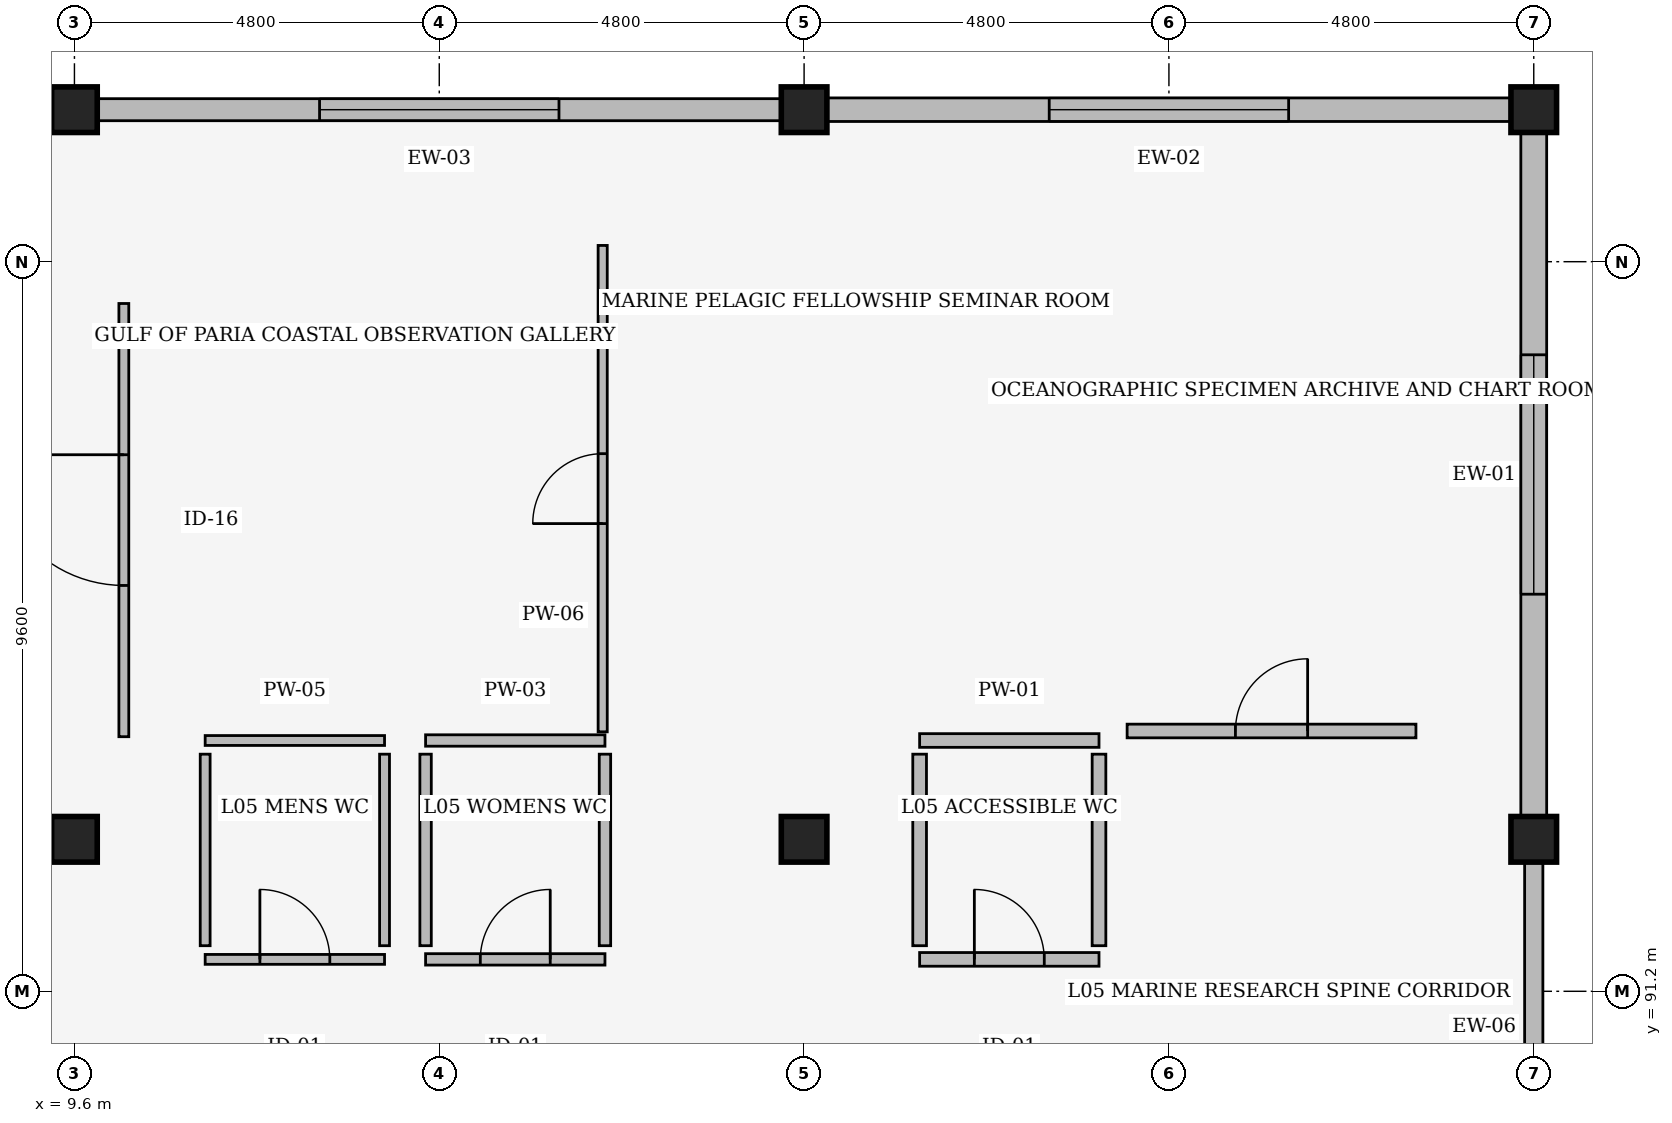
"""IFC4 building model, lengths in metres.
Left out: names, types, materials, properties, quantities, classifications, styles, units other than length and angle.
Written with IfcOpenShell. Run it as: python <this file> out.ifc"""

import sys

from ifc_helpers import new_model, si_unit, direction, frame, frame_2d, origin, origin_2d, place, context, subcontext, project, spatial, rectangle, extrude, element, fill, save


model = new_model("IFC4")
c1 = context("Model", 3, precision=1e-05, world=origin(), true_north=direction((0.0, 1.0)))
c2 = subcontext(c1, "Body", "Model", "MODEL_VIEW")
j1 = project(units=[si_unit("LENGTHUNIT", "METRE"), si_unit("PLANEANGLEUNIT", "RADIAN")], contexts=[c1])
p1 = place(None, origin())
s1 = spatial("IfcSite", under=j1, at=p1, CompositionType="ELEMENT")
p2 = place(p1, origin())
s2 = spatial("IfcBuilding", under=s1, at=p2, CompositionType="ELEMENT")
p3 = place(p2, frame((0.0, 0.0, 23.4)))
s3 = spatial("IfcBuildingStorey", under=s2, at=p3, CompositionType="ELEMENT", Elevation=23.4)
for number, where, z_axis, x_axis in (
    (1, (9.6, 93.2, 0.0), (0.0, 0.0, 1.0), (1.0, 0.0, 0.0)),
    (2, (9.6, 102.8, 0.0), (0.0, 0.0, 1.0), (1.0, 0.0, 0.0)),
    (3, (19.2, 93.2, 0.0), (0.0, 0.0, 1.0), (1.0, 0.0, 0.0)),
    (4, (19.2, 102.8, 0.0), (0.0, 0.0, 1.0), (1.0, 0.0, 0.0)),
    (5, (28.8, 93.2, 0.0), (0.0, 0.0, 1.0), (1.0, 0.0, 0.0)),
    (6, (28.8, 102.8, 0.0), (0.0, 0.0, 1.0), (1.0, 0.0, 0.0)),
):
    element("IfcColumn", number, at=place(p3, frame(where, z_axis=z_axis, x_axis=x_axis)), inside=s3, PredefinedType="COLUMN", context=c2, shape_type="SweptSolid", body=[
        extrude(rectangle(XDim=0.6, YDim=0.6, at=origin_2d()), origin(), (0.0, 0.0, 1.0), 3.6),
    ])
p4 = place(p3, frame((28.8, 83.908, 0.0), z_axis=(0.0, 0.0, 1.0), x_axis=(0.0, 1.0, 0.0)))
e7 = element("IfcWall", 7, at=p4, inside=s3, PredefinedType="SOLIDWALL", context=c2, shape_type="SweptSolid", body=[
    extrude(rectangle(XDim=8.984, YDim=0.24, at=frame_2d((4.492, 0.0))), origin(), (0.0, 0.0, 1.0), 3.239),
])
p5 = place(p4, frame((3.017, 0.0, 0.8)))
e8 = element("IfcOpeningElement", 8, at=p5, cuts=e7, PredefinedType="OPENING", context=c2, shape_type="SweptSolid", body=[
    extrude(rectangle(XDim=2.95, YDim=2.1, at=frame_2d((1.475, 1.05))), frame((0.0, 0.13, 0.0), z_axis=(0.0, -1.0, 0.0), x_axis=(1.0, 0.0, 0.0)), (0.0, 0.0, 1.0), 0.26),
])
p6 = place(p3, frame((28.8, 93.508, 0.0), z_axis=(0.0, 0.0, 1.0), x_axis=(0.0, 1.0, 0.0)))
e9 = element("IfcWall", 9, at=p6, inside=s3, PredefinedType="SOLIDWALL", context=c2, shape_type="SweptSolid", body=[
    extrude(rectangle(XDim=8.984, YDim=0.34, at=frame_2d((4.492, 0.0))), origin(), (0.0, 0.0, 1.0), 3.239),
])
p7 = place(p6, frame((2.917, 0.0, 0.95)))
e10 = element("IfcOpeningElement", 10, at=p7, cuts=e9, PredefinedType="OPENING", context=c2, shape_type="SweptSolid", body=[
    extrude(rectangle(XDim=3.15, YDim=1.2, at=frame_2d((1.575, 0.6))), frame((0.0, 0.18, 0.0), z_axis=(0.0, -1.0, 0.0), x_axis=(1.0, 0.0, 0.0)), (0.0, 0.0, 1.0), 0.36),
])
p8 = place(p3, frame((28.492, 102.8, 0.0), z_axis=(0.0, 0.0, 1.0), x_axis=(-1.0, 0.0, 0.0)))
e11 = element("IfcWall", 11, at=p8, inside=s3, PredefinedType="SOLIDWALL", context=c2, shape_type="SweptSolid", body=[
    extrude(rectangle(XDim=8.984, YDim=0.31, at=frame_2d((4.492, 0.0))), origin(), (0.0, 0.0, 1.0), 3.239),
])
p9 = place(p8, frame((2.917, 0.0, 0.95)))
e12 = element("IfcOpeningElement", 12, at=p9, cuts=e11, PredefinedType="OPENING", context=c2, shape_type="SweptSolid", body=[
    extrude(rectangle(XDim=3.15, YDim=1.5, at=frame_2d((1.575, 0.75))), frame((0.0, 0.165, 0.0), z_axis=(0.0, -1.0, 0.0), x_axis=(1.0, 0.0, 0.0)), (0.0, 0.0, 1.0), 0.33),
])
p10 = place(p3, frame((18.892, 102.8, 0.0), z_axis=(0.0, 0.0, 1.0), x_axis=(-1.0, 0.0, 0.0)))
e13 = element("IfcWall", 13, at=p10, inside=s3, PredefinedType="SOLIDWALL", context=c2, shape_type="SweptSolid", body=[
    extrude(rectangle(XDim=8.984, YDim=0.29, at=frame_2d((4.492, 0.0))), origin(), (0.0, 0.0, 1.0), 3.239),
])
p11 = place(p10, frame((2.917, 0.0, 0.95)))
e14 = element("IfcOpeningElement", 14, at=p11, cuts=e13, PredefinedType="OPENING", context=c2, shape_type="SweptSolid", body=[
    extrude(rectangle(XDim=3.15, YDim=1.8, at=frame_2d((1.575, 0.9))), frame((0.0, 0.155, 0.0), z_axis=(0.0, -1.0, 0.0), x_axis=(1.0, 0.0, 0.0)), (0.0, 0.0, 1.0), 0.31),
])
p12 = place(p3, frame((11.32, 94.5, 0.0), z_axis=(0.0, 0.0, 1.0), x_axis=(1.0, 0.0, 0.0)))
e15 = element("IfcWall", 15, at=p12, inside=s3, PredefinedType="PARTITIONING", context=c2, shape_type="SweptSolid", body=[
    extrude(rectangle(XDim=2.36, YDim=0.13, at=frame_2d((1.18, 0.0))), origin(), (0.0, 0.0, 1.0), 3.24),
])
p13 = place(p3, frame((11.32, 91.62, 0.0), z_axis=(0.0, 0.0, 1.0), x_axis=(1.0, 0.0, 0.0)))
e16 = element("IfcWall", 16, at=p13, inside=s3, PredefinedType="PARTITIONING", context=c2, shape_type="SweptSolid", body=[
    extrude(rectangle(XDim=2.36, YDim=0.13, at=frame_2d((1.18, 0.0))), origin(), (0.0, 0.0, 1.0), 3.24),
])
p14 = place(p13, frame((0.72, 0.0, 0.0)))
e17 = element("IfcOpeningElement", 17, at=p14, cuts=e16, PredefinedType="OPENING", context=c2, shape_type="SweptSolid", body=[
    extrude(rectangle(XDim=0.92, YDim=2.12, at=frame_2d((0.46, 1.06))), frame((0.0, 0.075, 0.0), z_axis=(0.0, -1.0, 0.0), x_axis=(1.0, 0.0, 0.0)), (0.0, 0.0, 1.0), 0.15),
])
for number, where, z_axis, x_axis in (
    (18, (11.32, 91.8, 0.0), (0.0, 0.0, 1.0), (0.0, 1.0, 0.0)),
    (19, (13.68, 91.8, 0.0), (0.0, 0.0, 1.0), (0.0, 1.0, 0.0)),
):
    element("IfcWall", number, at=place(p3, frame(where, z_axis=z_axis, x_axis=x_axis)), inside=s3, PredefinedType="PARTITIONING", context=c2, shape_type="SweptSolid", body=[
        extrude(rectangle(XDim=2.52, YDim=0.13, at=frame_2d((1.26, 0.0))), origin(), (0.0, 0.0, 1.0), 3.24),
    ])
p15 = place(p3, frame((14.22, 94.5, 0.0), z_axis=(0.0, 0.0, 1.0), x_axis=(1.0, 0.0, 0.0)))
e20 = element("IfcWall", 20, at=p15, inside=s3, PredefinedType="PARTITIONING", context=c2, shape_type="SweptSolid", body=[
    extrude(rectangle(XDim=2.36, YDim=0.15, at=frame_2d((1.18, 0.0))), origin(), (0.0, 0.0, 1.0), 3.24),
])
p16 = place(p3, frame((14.22, 91.62, 0.0), z_axis=(0.0, 0.0, 1.0), x_axis=(1.0, 0.0, 0.0)))
e21 = element("IfcWall", 21, at=p16, inside=s3, PredefinedType="PARTITIONING", context=c2, shape_type="SweptSolid", body=[
    extrude(rectangle(XDim=2.36, YDim=0.15, at=frame_2d((1.18, 0.0))), origin(), (0.0, 0.0, 1.0), 3.24),
])
p17 = place(p16, frame((0.72, 0.0, 0.0)))
e22 = element("IfcOpeningElement", 22, at=p17, cuts=e21, PredefinedType="OPENING", context=c2, shape_type="SweptSolid", body=[
    extrude(rectangle(XDim=0.92, YDim=2.12, at=frame_2d((0.46, 1.06))), frame((0.0, 0.085, 0.0), z_axis=(0.0, -1.0, 0.0), x_axis=(1.0, 0.0, 0.0)), (0.0, 0.0, 1.0), 0.17),
])
for number, where, z_axis, x_axis in (
    (23, (14.22, 91.8, 0.0), (0.0, 0.0, 1.0), (0.0, 1.0, 0.0)),
    (24, (16.58, 91.8, 0.0), (0.0, 0.0, 1.0), (0.0, 1.0, 0.0)),
):
    element("IfcWall", number, at=place(p3, frame(where, z_axis=z_axis, x_axis=x_axis)), inside=s3, PredefinedType="PARTITIONING", context=c2, shape_type="SweptSolid", body=[
        extrude(rectangle(XDim=2.52, YDim=0.15, at=frame_2d((1.26, 0.0))), origin(), (0.0, 0.0, 1.0), 3.24),
    ])
p18 = place(p3, frame((20.72, 94.5, 0.0), z_axis=(0.0, 0.0, 1.0), x_axis=(1.0, 0.0, 0.0)))
e25 = element("IfcWall", 25, at=p18, inside=s3, PredefinedType="PARTITIONING", context=c2, shape_type="SweptSolid", body=[
    extrude(rectangle(XDim=2.36, YDim=0.18, at=frame_2d((1.18, 0.0))), origin(), (0.0, 0.0, 1.0), 3.24),
])
p19 = place(p3, frame((20.72, 91.62, 0.0), z_axis=(0.0, 0.0, 1.0), x_axis=(1.0, 0.0, 0.0)))
e26 = element("IfcWall", 26, at=p19, inside=s3, PredefinedType="PARTITIONING", context=c2, shape_type="SweptSolid", body=[
    extrude(rectangle(XDim=2.36, YDim=0.18, at=frame_2d((1.18, 0.0))), origin(), (0.0, 0.0, 1.0), 3.24),
])
p20 = place(p19, frame((0.72, 0.0, 0.0)))
e27 = element("IfcOpeningElement", 27, at=p20, cuts=e26, PredefinedType="OPENING", context=c2, shape_type="SweptSolid", body=[
    extrude(rectangle(XDim=0.92, YDim=2.12, at=frame_2d((0.46, 1.06))), frame((0.0, 0.1, 0.0), z_axis=(0.0, -1.0, 0.0), x_axis=(1.0, 0.0, 0.0)), (0.0, 0.0, 1.0), 0.2),
])
for number, where, z_axis, x_axis in (
    (28, (20.72, 91.8, 0.0), (0.0, 0.0, 1.0), (0.0, 1.0, 0.0)),
    (29, (23.08, 91.8, 0.0), (0.0, 0.0, 1.0), (0.0, 1.0, 0.0)),
):
    element("IfcWall", number, at=place(p3, frame(where, z_axis=z_axis, x_axis=x_axis)), inside=s3, PredefinedType="PARTITIONING", context=c2, shape_type="SweptSolid", body=[
        extrude(rectangle(XDim=2.52, YDim=0.18, at=frame_2d((1.26, 0.0))), origin(), (0.0, 0.0, 1.0), 3.24),
    ])
p21 = place(p3, frame((10.25, 94.55, 0.0), z_axis=(0.0, 0.0, 1.0), x_axis=(0.0, 1.0, 0.0)))
e30 = element("IfcWall", 30, at=p21, inside=s3, PredefinedType="PARTITIONING", context=c2, shape_type="SweptSolid", body=[
    extrude(rectangle(XDim=5.7, YDim=0.13, at=frame_2d((2.85, 0.0))), origin(), (0.0, 0.0, 1.0), 3.24),
])
p22 = place(p21, frame((1.99, 0.0, 0.0)))
e31 = element("IfcOpeningElement", 31, at=p22, cuts=e30, PredefinedType="OPENING", context=c2, shape_type="SweptSolid", body=[
    extrude(rectangle(XDim=1.72, YDim=2.38, at=frame_2d((0.86, 1.19))), frame((0.0, 0.075, 0.0), z_axis=(0.0, -1.0, 0.0), x_axis=(1.0, 0.0, 0.0)), (0.0, 0.0, 1.0), 0.15),
])
p23 = place(p3, frame((16.55, 94.614, 0.0), z_axis=(0.0, 0.0, 1.0), x_axis=(0.0, 1.0, 0.0)))
e32 = element("IfcWall", 32, at=p23, inside=s3, PredefinedType="PARTITIONING", context=c2, shape_type="SweptSolid", body=[
    extrude(rectangle(XDim=6.4, YDim=0.12, at=frame_2d((3.2, 0.0))), origin(), (0.0, 0.0, 1.0), 3.24),
])
p24 = place(p23, frame((2.74, 0.0, 0.0)))
e33 = element("IfcOpeningElement", 33, at=p24, cuts=e32, PredefinedType="OPENING", context=c2, shape_type="SweptSolid", body=[
    extrude(rectangle(XDim=0.92, YDim=2.12, at=frame_2d((0.46, 1.06))), frame((0.0, 0.07, 0.0), z_axis=(0.0, -1.0, 0.0), x_axis=(1.0, 0.0, 0.0)), (0.0, 0.0, 1.0), 0.14),
])
p25 = place(p3, frame((23.45, 94.625, 0.0), z_axis=(0.0, 0.0, 1.0), x_axis=(1.0, 0.0, 0.0)))
e34 = element("IfcWall", 34, at=p25, inside=s3, PredefinedType="PARTITIONING", context=c2, shape_type="SweptSolid", body=[
    extrude(rectangle(XDim=3.8, YDim=0.18, at=frame_2d((1.9, 0.0))), origin(), (0.0, 0.0, 1.0), 3.24),
])
p26 = place(p25, frame((1.425, 0.0, 0.0)))
e35 = element("IfcOpeningElement", 35, at=p26, cuts=e34, PredefinedType="OPENING", context=c2, shape_type="SweptSolid", body=[
    extrude(rectangle(XDim=0.95, YDim=2.15, at=frame_2d((0.475, 1.075))), frame((0.0, 0.1, 0.0), z_axis=(0.0, -1.0, 0.0), x_axis=(1.0, 0.0, 0.0)), (0.0, 0.0, 1.0), 0.2),
])
p27 = place(p7, origin())
e36 = element("IfcWindow", 36, at=p27, inside=s3, PartitioningType="SINGLE_PANEL", PredefinedType="WINDOW", context=c2, shape_type="SweptSolid", body=[
    extrude(rectangle(XDim=3.15, YDim=1.2, at=frame_2d((1.575, 0.6))), frame((0.0, 0.03, 0.0), z_axis=(0.0, -1.0, 0.0), x_axis=(1.0, 0.0, 0.0)), (0.0, 0.0, 1.0), 0.06),
])
fill(e10, e36)
p28 = place(p9, origin())
e37 = element("IfcWindow", 37, at=p28, inside=s3, PartitioningType="SINGLE_PANEL", PredefinedType="WINDOW", context=c2, shape_type="SweptSolid", body=[
    extrude(rectangle(XDim=3.15, YDim=1.5, at=frame_2d((1.575, 0.75))), frame((0.0, 0.03, 0.0), z_axis=(0.0, -1.0, 0.0), x_axis=(1.0, 0.0, 0.0)), (0.0, 0.0, 1.0), 0.06),
])
fill(e12, e37)
p29 = place(p11, origin())
e38 = element("IfcWindow", 38, at=p29, inside=s3, PartitioningType="SINGLE_PANEL", PredefinedType="WINDOW", context=c2, shape_type="SweptSolid", body=[
    extrude(rectangle(XDim=3.15, YDim=1.8, at=frame_2d((1.575, 0.9))), frame((0.0, 0.03, 0.0), z_axis=(0.0, -1.0, 0.0), x_axis=(1.0, 0.0, 0.0)), (0.0, 0.0, 1.0), 0.06),
])
fill(e14, e38)
p30 = place(p14, origin())
e39 = element("IfcDoor", 39, at=p30, inside=s3, OperationType="SINGLE_SWING_LEFT", PredefinedType="DOOR", context=c2, shape_type="SweptSolid", body=[
    extrude(rectangle(XDim=0.92, YDim=2.12, at=frame_2d((0.46, 1.06))), frame((0.0, 0.025, 0.0), z_axis=(0.0, -1.0, 0.0), x_axis=(1.0, 0.0, 0.0)), (0.0, 0.0, 1.0), 0.05),
])
fill(e17, e39)
p31 = place(p17, origin())
e40 = element("IfcDoor", 40, at=p31, inside=s3, OperationType="SINGLE_SWING_RIGHT", PredefinedType="DOOR", context=c2, shape_type="SweptSolid", body=[
    extrude(rectangle(XDim=0.92, YDim=2.12, at=frame_2d((0.46, 1.06))), frame((0.0, 0.025, 0.0), z_axis=(0.0, -1.0, 0.0), x_axis=(1.0, 0.0, 0.0)), (0.0, 0.0, 1.0), 0.05),
])
fill(e22, e40)
p32 = place(p20, origin())
e41 = element("IfcDoor", 41, at=p32, inside=s3, OperationType="SINGLE_SWING_LEFT", PredefinedType="DOOR", context=c2, shape_type="SweptSolid", body=[
    extrude(rectangle(XDim=0.92, YDim=2.12, at=frame_2d((0.46, 1.06))), frame((0.0, 0.025, 0.0), z_axis=(0.0, -1.0, 0.0), x_axis=(1.0, 0.0, 0.0)), (0.0, 0.0, 1.0), 0.05),
])
fill(e27, e41)
p33 = place(p22, origin())
e42 = element("IfcDoor", 42, at=p33, inside=s3, OperationType="SINGLE_SWING_RIGHT", PredefinedType="DOOR", context=c2, shape_type="SweptSolid", body=[
    extrude(rectangle(XDim=1.72, YDim=2.38, at=frame_2d((0.86, 1.19))), frame((0.0, 0.025, 0.0), z_axis=(0.0, -1.0, 0.0), x_axis=(1.0, 0.0, 0.0)), (0.0, 0.0, 1.0), 0.05),
])
fill(e31, e42)
p34 = place(p24, origin())
e43 = element("IfcDoor", 43, at=p34, inside=s3, OperationType="SINGLE_SWING_LEFT", PredefinedType="DOOR", context=c2, shape_type="SweptSolid", body=[
    extrude(rectangle(XDim=0.92, YDim=2.12, at=frame_2d((0.46, 1.06))), frame((0.0, 0.025, 0.0), z_axis=(0.0, -1.0, 0.0), x_axis=(1.0, 0.0, 0.0)), (0.0, 0.0, 1.0), 0.05),
])
fill(e33, e43)
p35 = place(p26, origin())
e44 = element("IfcDoor", 44, at=p35, inside=s3, OperationType="SINGLE_SWING_RIGHT", PredefinedType="DOOR", context=c2, shape_type="SweptSolid", body=[
    extrude(rectangle(XDim=0.95, YDim=2.15, at=frame_2d((0.475, 1.075))), frame((0.0, 0.025, 0.0), z_axis=(0.0, -1.0, 0.0), x_axis=(1.0, 0.0, 0.0)), (0.0, 0.0, 1.0), 0.05),
])
fill(e35, e44)
save(model, sys.argv[1])
